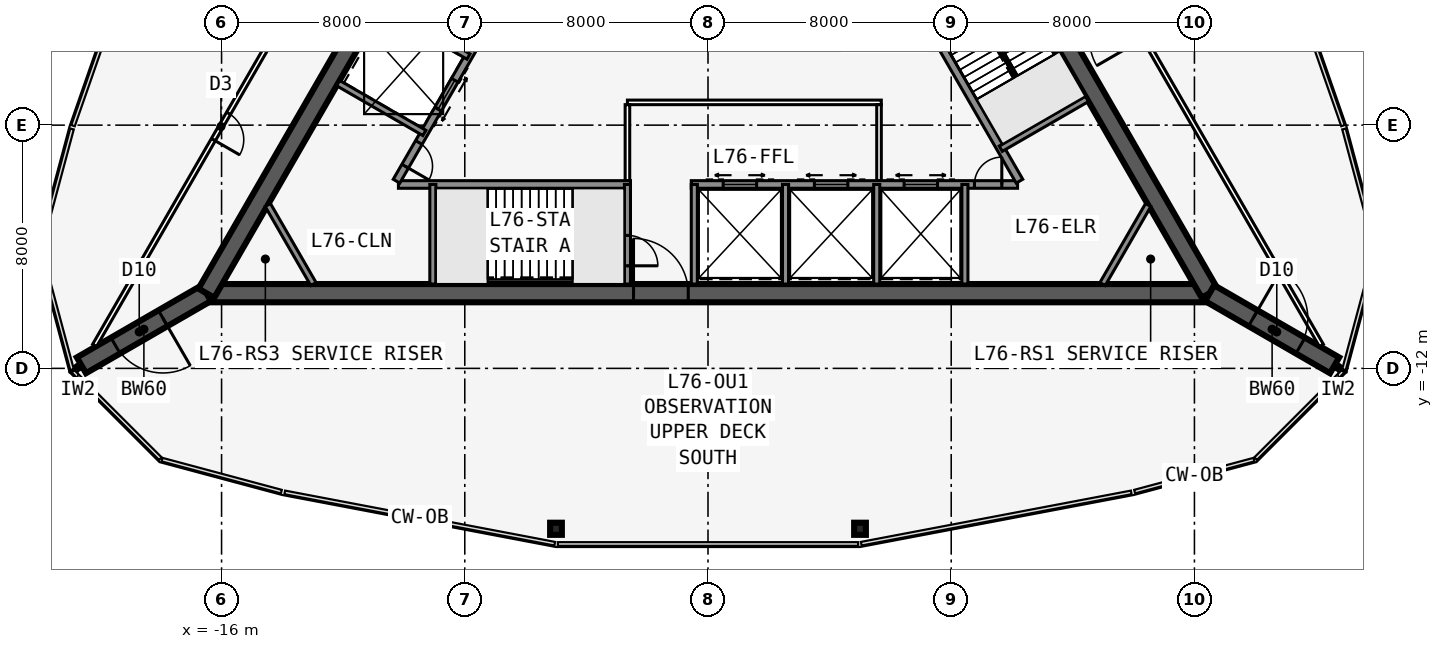
"""IFC4 building model, lengths in metres.
Left out: names, types, materials, properties, quantities, classifications, styles, units other than length and angle.
Written with IfcOpenShell. Run it as: python <this file> out.ifc"""

import sys

from ifc_helpers import new_model, si_unit, direction, frame, frame_2d, origin, origin_2d, place, context, subcontext, project, spatial, rectangle, i_section, extrude, element, fill, save


model = new_model("IFC4")
c1 = context("Model", 3, precision=1e-05, world=origin(), true_north=direction((0.0, 1.0)))
c2 = subcontext(c1, "Body", "Model", "MODEL_VIEW")
j1 = project(units=[si_unit("LENGTHUNIT", "METRE"), si_unit("PLANEANGLEUNIT", "RADIAN")], contexts=[c1])
p1 = place(None, origin())
s1 = spatial("IfcSite", under=j1, at=p1, CompositionType="ELEMENT")
p2 = place(p1, origin())
s2 = spatial("IfcBuilding", under=s1, at=p2, CompositionType="ELEMENT")
p3 = place(p2, frame((0.0, 0.0, 292.8)))
s3 = spatial("IfcBuildingStorey", under=s2, at=p3, CompositionType="ELEMENT", Elevation=292.8)
p4 = place(p3, frame((-16.5, -9.526, 0.0), z_axis=(0.0, 0.0, 1.0), x_axis=(1.0, 0.0, 0.0)))
e1 = element("IfcWall", 1, at=p4, inside=s3, PredefinedType="SHEAR", context=c2, shape_type="SweptSolid", body=[
    extrude(rectangle(XDim=33.0, YDim=0.6, at=frame_2d((16.5, 0.0))), origin(), (0.0, 0.0, 1.0), 5.0),
])
p5 = place(p4, frame((14.05, 0.0, 0.0)))
e2 = element("IfcOpeningElement", 2, at=p5, cuts=e1, PredefinedType="OPENING", context=c2, shape_type="SweptSolid", body=[
    extrude(rectangle(XDim=1.8, YDim=2.13, at=frame_2d((0.9, 1.065))), frame((0.0, 0.31, 0.0), z_axis=(0.0, -1.0, 0.0), x_axis=(1.0, 0.0, 0.0)), (0.0, 0.0, 1.0), 0.62),
])
p6 = place(p3, frame((-10.183, -5.951, 0.0), z_axis=(0.0, 0.0, 1.0), x_axis=(1.0, 0.0, 0.0)))
e3 = element("IfcWall", 3, at=p6, inside=s3, PredefinedType="SOLIDWALL", context=c2, shape_type="SweptSolid", body=[
    extrude(rectangle(XDim=7.633, YDim=0.25, at=frame_2d((3.816, 0.0))), origin(), (0.0, 0.0, 1.0), 4.75),
])
p7 = place(p3, frame((-0.55, -5.951, 0.0), z_axis=(0.0, 0.0, 1.0), x_axis=(1.0, 0.0, 0.0)))
e4 = element("IfcWall", 4, at=p7, inside=s3, PredefinedType="SOLIDWALL", context=c2, shape_type="SweptSolid", body=[
    extrude(rectangle(XDim=10.733, YDim=0.25, at=frame_2d((5.366, 0.0))), origin(), (0.0, 0.0, 1.0), 4.75),
])
p8 = place(p7, frame((9.314, 0.0, 0.0)))
e5 = element("IfcOpeningElement", 5, at=p8, cuts=e4, PredefinedType="OPENING", context=c2, shape_type="SweptSolid", body=[
    extrude(rectangle(XDim=0.9, YDim=2.13, at=frame_2d((0.45, 1.065))), frame((0.0, 0.135, 0.0), z_axis=(0.0, -1.0, 0.0), x_axis=(1.0, 0.0, 0.0)), (0.0, 0.0, 1.0), 0.27),
])
p9 = place(p7, frame((1.05, 0.0, 0.0)))
e6 = element("IfcOpeningElement", 6, at=p9, cuts=e4, PredefinedType="OPENING", context=c2, shape_type="SweptSolid", body=[
    extrude(rectangle(XDim=1.1, YDim=2.13, at=frame_2d((0.55, 1.065))), frame((0.0, 0.135, 0.0), z_axis=(0.0, -1.0, 0.0), x_axis=(1.0, 0.0, 0.0)), (0.0, 0.0, 1.0), 0.27),
])
p10 = place(p7, frame((4.05, 0.0, 0.0)))
e7 = element("IfcOpeningElement", 7, at=p10, cuts=e4, PredefinedType="OPENING", context=c2, shape_type="SweptSolid", body=[
    extrude(rectangle(XDim=1.1, YDim=2.13, at=frame_2d((0.55, 1.065))), frame((0.0, 0.135, 0.0), z_axis=(0.0, -1.0, 0.0), x_axis=(1.0, 0.0, 0.0)), (0.0, 0.0, 1.0), 0.27),
])
p11 = place(p7, frame((7.0, 0.0, 0.0)))
e8 = element("IfcOpeningElement", 8, at=p11, cuts=e4, PredefinedType="OPENING", context=c2, shape_type="SweptSolid", body=[
    extrude(rectangle(XDim=1.1, YDim=2.13, at=frame_2d((0.55, 1.065))), frame((0.0, 0.135, 0.0), z_axis=(0.0, -1.0, 0.0), x_axis=(1.0, 0.0, 0.0)), (0.0, 0.0, 1.0), 0.27),
])
p12 = place(p3, frame((-9.05, -5.951, 0.0), z_axis=(0.0, 0.0, 1.0), x_axis=(0.0, -1.0, 0.0)))
e9 = element("IfcWall", 9, at=p12, inside=s3, PredefinedType="SOLIDWALL", context=c2, shape_type="SweptSolid", body=[
    extrude(rectangle(XDim=3.275, YDim=0.2, at=frame_2d((1.637, 0.0))), origin(), (0.0, 0.0, 1.0), 4.75),
])
p13 = place(p3, frame((-2.65, -5.951, 0.0), z_axis=(0.0, 0.0, 1.0), x_axis=(0.0, -1.0, 0.0)))
e10 = element("IfcWall", 10, at=p13, inside=s3, PredefinedType="SOLIDWALL", context=c2, shape_type="SweptSolid", body=[
    extrude(rectangle(XDim=3.275, YDim=0.2, at=frame_2d((1.637, 0.0))), origin(), (0.0, 0.0, 1.0), 4.75),
])
p14 = place(p13, frame((1.675, 0.0, 0.0)))
e11 = element("IfcOpeningElement", 11, at=p14, cuts=e10, PredefinedType="OPENING", context=c2, shape_type="SweptSolid", body=[
    extrude(rectangle(XDim=1.0, YDim=2.13, at=frame_2d((0.5, 1.065))), frame((0.0, 0.11, 0.0), z_axis=(0.0, -1.0, 0.0), x_axis=(1.0, 0.0, 0.0)), (0.0, 0.0, 1.0), 0.22),
])
for number, where, z_axis, x_axis in (
    (12, (-0.45, -5.951, 0.0), (0.0, 0.0, 1.0), (0.0, -1.0, 0.0)),
    (13, (2.55, -5.951, 0.0), (0.0, 0.0, 1.0), (0.0, -1.0, 0.0)),
    (14, (5.55, -5.951, 0.0), (0.0, 0.0, 1.0), (0.0, -1.0, 0.0)),
    (15, (8.45, -5.951, 0.0), (0.0, 0.0, 1.0), (0.0, -1.0, 0.0)),
):
    element("IfcWall", number, at=place(p3, frame(where, z_axis=z_axis, x_axis=x_axis)), inside=s3, PredefinedType="SOLIDWALL", context=c2, shape_type="SweptSolid", body=[
        extrude(rectangle(XDim=3.275, YDim=0.2, at=frame_2d((1.637, 0.0))), origin(), (0.0, 0.0, 1.0), 4.75),
    ])
p15 = place(p3, frame((16.5, -9.526, 0.0), z_axis=(0.0, 0.0, 1.0), x_axis=(-0.499999749417, 0.866025548458, 0.0)))
e16 = element("IfcWall", 16, at=p15, inside=s3, PredefinedType="SHEAR", context=c2, shape_type="SweptSolid", body=[
    extrude(rectangle(XDim=33.0, YDim=0.6, at=frame_2d((16.5, 0.0))), origin(), (0.0, 0.0, 1.0), 5.0),
])
p16 = place(p15, frame((14.15, 0.0, 0.0)))
e17 = element("IfcOpeningElement", 17, at=p16, cuts=e16, PredefinedType="OPENING", context=c2, shape_type="SweptSolid", body=[
    extrude(rectangle(XDim=1.8, YDim=2.13, at=frame_2d((0.9, 1.065))), frame((0.0, 0.31, 0.0), z_axis=(0.0, -1.0, 0.0), x_axis=(1.0, 0.0, 0.0)), (0.0, 0.0, 1.0), 0.62),
])
p17 = place(p15, frame((12.6, 0.0, 0.0)))
e18 = element("IfcOpeningElement", 18, at=p17, cuts=e16, PredefinedType="OPENING", context=c2, shape_type="SweptSolid", body=[
    extrude(rectangle(XDim=1.0, YDim=2.13, at=frame_2d((0.5, 1.065))), frame((0.0, 0.31, 0.0), z_axis=(0.0, -1.0, 0.0), x_axis=(1.0, 0.0, 0.0)), (0.0, 0.0, 1.0), 0.62),
])
p18 = place(p3, frame((10.245, -5.843, 0.0), z_axis=(0.0, 0.0, 1.0), x_axis=(-0.499993009313, 0.866029439822, 0.0)))
e19 = element("IfcWall", 19, at=p18, inside=s3, PredefinedType="SOLIDWALL", context=c2, shape_type="SweptSolid", body=[
    extrude(rectangle(XDim=7.733, YDim=0.25, at=frame_2d((3.866, 0.0))), origin(), (0.0, 0.0, 1.0), 4.75),
])
p19 = place(p3, frame((9.629, -4.775, 0.0), z_axis=(0.0, 0.0, 1.0), x_axis=(0.865995643347, 0.500051543047, 0.0)))
e20 = element("IfcWall", 20, at=p19, inside=s3, PredefinedType="SOLIDWALL", context=c2, shape_type="SweptSolid", body=[
    extrude(rectangle(XDim=3.275, YDim=0.2, at=frame_2d((1.638, 0.0))), origin(), (0.0, 0.0, 1.0), 4.75),
])
p20 = place(p3, frame((0.0, 19.052, 0.0), z_axis=(0.0, 0.0, 1.0), x_axis=(-0.499999749417, -0.866025548458, 0.0)))
e21 = element("IfcWall", 21, at=p20, inside=s3, PredefinedType="SHEAR", context=c2, shape_type="SweptSolid", body=[
    extrude(rectangle(XDim=33.0, YDim=0.6, at=frame_2d((16.5, 0.0))), origin(), (0.0, 0.0, 1.0), 5.0),
])
p21 = place(p20, frame((14.15, 0.0, 0.0)))
e22 = element("IfcOpeningElement", 22, at=p21, cuts=e21, PredefinedType="OPENING", context=c2, shape_type="SweptSolid", body=[
    extrude(rectangle(XDim=1.8, YDim=2.13, at=frame_2d((0.9, 1.065))), frame((0.0, 0.31, 0.0), z_axis=(0.0, -1.0, 0.0), x_axis=(1.0, 0.0, 0.0)), (0.0, 0.0, 1.0), 0.62),
])
p22 = place(p20, frame((12.6, 0.0, 0.0)))
e23 = element("IfcOpeningElement", 23, at=p22, cuts=e21, PredefinedType="OPENING", context=c2, shape_type="SweptSolid", body=[
    extrude(rectangle(XDim=1.0, YDim=2.13, at=frame_2d((0.5, 1.065))), frame((0.0, 0.31, 0.0), z_axis=(0.0, -1.0, 0.0), x_axis=(1.0, 0.0, 0.0)), (0.0, 0.0, 1.0), 0.62),
])
p23 = place(p3, frame((-4.929, 3.365, 0.0), z_axis=(0.0, 0.0, 1.0), x_axis=(-0.499991433582, -0.866030349552, 0.0)))
e24 = element("IfcWall", 24, at=p23, inside=s3, PredefinedType="SOLIDWALL", context=c2, shape_type="SweptSolid", body=[
    extrude(rectangle(XDim=10.633, YDim=0.25, at=frame_2d((5.316, 0.0))), origin(), (0.0, 0.0, 1.0), 4.75),
])
p24 = place(p23, frame((9.164, 0.0, 0.0)))
e25 = element("IfcOpeningElement", 25, at=p24, cuts=e24, PredefinedType="OPENING", context=c2, shape_type="SweptSolid", body=[
    extrude(rectangle(XDim=0.9, YDim=2.13, at=frame_2d((0.45, 1.065))), frame((0.0, 0.135, 0.0), z_axis=(0.0, -1.0, 0.0), x_axis=(1.0, 0.0, 0.0)), (0.0, 0.0, 1.0), 0.27),
])
p25 = place(p23, frame((1.1, 0.0, 0.0)))
e26 = element("IfcOpeningElement", 26, at=p25, cuts=e24, PredefinedType="OPENING", context=c2, shape_type="SweptSolid", body=[
    extrude(rectangle(XDim=0.9, YDim=2.13, at=frame_2d((0.45, 1.065))), frame((0.0, 0.135, 0.0), z_axis=(0.0, -1.0, 0.0), x_axis=(1.0, 0.0, 0.0)), (0.0, 0.0, 1.0), 0.27),
])
p26 = place(p23, frame((4.0, 0.0, 0.0)))
e27 = element("IfcOpeningElement", 27, at=p26, cuts=e24, PredefinedType="OPENING", context=c2, shape_type="SweptSolid", body=[
    extrude(rectangle(XDim=0.9, YDim=2.13, at=frame_2d((0.45, 1.065))), frame((0.0, 0.135, 0.0), z_axis=(0.0, -1.0, 0.0), x_axis=(1.0, 0.0, 0.0)), (0.0, 0.0, 1.0), 0.27),
])
p27 = place(p23, frame((6.8, 0.0, 0.0)))
e28 = element("IfcOpeningElement", 28, at=p27, cuts=e24, PredefinedType="OPENING", context=c2, shape_type="SweptSolid", body=[
    extrude(rectangle(XDim=1.1, YDim=2.13, at=frame_2d((0.55, 1.065))), frame((0.0, 0.135, 0.0), z_axis=(0.0, -1.0, 0.0), x_axis=(1.0, 0.0, 0.0)), (0.0, 0.0, 1.0), 0.27),
])
for number, where, z_axis, x_axis in (
    (29, (-7.879, -1.744, 0.0), (0.0, 0.0, 1.0), (-0.866, 0.5, 0.0)),
    (30, (-9.329, -4.256, 0.0), (0.0, 0.0, 1.0), (-0.866, 0.5, 0.0)),
):
    element("IfcWall", number, at=place(p3, frame(where, z_axis=z_axis, x_axis=x_axis)), inside=s3, PredefinedType="SOLIDWALL", context=c2, shape_type="SweptSolid", body=[
        extrude(rectangle(XDim=3.275, YDim=0.2, at=frame_2d((1.637, 0.0))), origin(), (0.0, 0.0, 1.0), 4.75),
    ])
p28 = place(p3, frame((16.5, -9.526, 0.0), z_axis=(0.0, 0.0, 1.0), x_axis=(0.866031398331, -0.499989616998, 0.0)))
e31 = element("IfcWall", 31, at=p28, inside=s3, PredefinedType="SHEAR", context=c2, shape_type="SweptSolid", body=[
    extrude(rectangle(XDim=4.746, YDim=0.6, at=frame_2d((2.373, 0.0))), origin(), (0.0, 0.0, 1.0), 5.0),
])
p29 = place(p28, frame((1.65, 0.0, 0.0)))
e32 = element("IfcOpeningElement", 32, at=p29, cuts=e31, PredefinedType="OPENING", context=c2, shape_type="SweptSolid", body=[
    extrude(rectangle(XDim=1.8, YDim=2.13, at=frame_2d((0.9, 1.065))), frame((0.0, 0.31, 0.0), z_axis=(0.0, -1.0, 0.0), x_axis=(1.0, 0.0, 0.0)), (0.0, 0.0, 1.0), 0.62),
])
p30 = place(p3, frame((-16.5, -9.526, 0.0), z_axis=(0.0, 0.0, 1.0), x_axis=(-0.866031398331, -0.499989616998, 0.0)))
e33 = element("IfcWall", 33, at=p30, inside=s3, PredefinedType="SHEAR", context=c2, shape_type="SweptSolid", body=[
    extrude(rectangle(XDim=4.746, YDim=0.6, at=frame_2d((2.373, 0.0))), origin(), (0.0, 0.0, 1.0), 5.0),
])
p31 = place(p30, frame((1.65, 0.0, 0.0)))
e34 = element("IfcOpeningElement", 34, at=p31, cuts=e33, PredefinedType="OPENING", context=c2, shape_type="SweptSolid", body=[
    extrude(rectangle(XDim=1.8, YDim=2.13, at=frame_2d((0.9, 1.065))), frame((0.0, 0.31, 0.0), z_axis=(0.0, -1.0, 0.0), x_axis=(1.0, 0.0, 0.0)), (0.0, 0.0, 1.0), 0.62),
])
for number, where, z_axis, x_axis in (
    (35, (-5.0, -17.276, 0.0), (0.0, 0.0, 1.0), (0.0, -1.0, 0.0)),
    (36, (5.0, -17.276, 0.0), (0.0, 0.0, 1.0), (0.0, -1.0, 0.0)),
):
    element("IfcColumn", number, at=place(p3, frame(where, z_axis=z_axis, x_axis=x_axis)), inside=s3, PredefinedType="COLUMN", context=c2, shape_type="SweptSolid", body=[
        extrude(i_section(OverallWidth=0.399, OverallDepth=0.386, WebThickness=0.021, FlangeThickness=0.033, at=origin_2d()), origin(), (0.0, 0.0, 1.0), 5.0),
    ])
p32 = place(p3, frame((20.177, -11.245, 0.0), z_axis=(0.0, 0.0, 1.0), x_axis=(-0.499998875317, 0.866026053119, 0.0)))
e37 = element("IfcWall", 37, at=p32, inside=s3, PredefinedType="PARTITIONING", context=c2, shape_type="SweptSolid", body=[
    extrude(rectangle(XDim=39.654, YDim=0.15, at=frame_2d((19.827, 0.0))), origin(), (0.0, 0.0, 1.0), 4.75),
])
p33 = place(p32, frame((11.664, 0.0, 0.0)))
e38 = element("IfcOpeningElement", 38, at=p33, cuts=e37, PredefinedType="OPENING", context=c2, shape_type="SweptSolid", body=[
    extrude(rectangle(XDim=1.8, YDim=2.13, at=frame_2d((0.9, 1.065))), frame((0.0, 0.085, 0.0), z_axis=(0.0, -1.0, 0.0), x_axis=(1.0, 0.0, 0.0)), (0.0, 0.0, 1.0), 0.17),
])
p34 = place(p32, frame((31.19, 0.0, 0.0)))
e39 = element("IfcOpeningElement", 39, at=p34, cuts=e37, PredefinedType="OPENING", context=c2, shape_type="SweptSolid", body=[
    extrude(rectangle(XDim=1.8, YDim=2.13, at=frame_2d((0.9, 1.065))), frame((0.0, 0.085, 0.0), z_axis=(0.0, -1.0, 0.0), x_axis=(1.0, 0.0, 0.0)), (0.0, 0.0, 1.0), 0.17),
])
p35 = place(p3, frame((-0.35, 23.096, 0.0), z_axis=(0.0, 0.0, 1.0), x_axis=(-0.499998875317, -0.866026053119, 0.0)))
e40 = element("IfcWall", 40, at=p35, inside=s3, PredefinedType="PARTITIONING", context=c2, shape_type="SweptSolid", body=[
    extrude(rectangle(XDim=39.654, YDim=0.15, at=frame_2d((19.827, 0.0))), origin(), (0.0, 0.0, 1.0), 4.75),
])
p36 = place(p35, frame((6.664, 0.0, 0.0)))
e41 = element("IfcOpeningElement", 41, at=p36, cuts=e40, PredefinedType="OPENING", context=c2, shape_type="SweptSolid", body=[
    extrude(rectangle(XDim=1.8, YDim=2.13, at=frame_2d((0.9, 1.065))), frame((0.0, 0.085, 0.0), z_axis=(0.0, -1.0, 0.0), x_axis=(1.0, 0.0, 0.0)), (0.0, 0.0, 1.0), 0.17),
])
p37 = place(p35, frame((15.827, 0.0, 0.0)))
e42 = element("IfcOpeningElement", 42, at=p37, cuts=e40, PredefinedType="OPENING", context=c2, shape_type="SweptSolid", body=[
    extrude(rectangle(XDim=1.0, YDim=2.13, at=frame_2d((0.5, 1.065))), frame((0.0, 0.085, 0.0), z_axis=(0.0, -1.0, 0.0), x_axis=(1.0, 0.0, 0.0)), (0.0, 0.0, 1.0), 0.17),
])
p38 = place(p35, frame((18.827, 0.0, 0.0)))
e43 = element("IfcOpeningElement", 43, at=p38, cuts=e40, PredefinedType="OPENING", context=c2, shape_type="SweptSolid", body=[
    extrude(rectangle(XDim=1.0, YDim=2.13, at=frame_2d((0.5, 1.065))), frame((0.0, 0.085, 0.0), z_axis=(0.0, -1.0, 0.0), x_axis=(1.0, 0.0, 0.0)), (0.0, 0.0, 1.0), 0.17),
])
p39 = place(p35, frame((21.577, 0.0, 0.0)))
e44 = element("IfcOpeningElement", 44, at=p39, cuts=e40, PredefinedType="OPENING", context=c2, shape_type="SweptSolid", body=[
    extrude(rectangle(XDim=1.0, YDim=2.13, at=frame_2d((0.5, 1.065))), frame((0.0, 0.085, 0.0), z_axis=(0.0, -1.0, 0.0), x_axis=(1.0, 0.0, 0.0)), (0.0, 0.0, 1.0), 0.17),
])
p40 = place(p35, frame((30.841, 0.0, 0.0)))
e45 = element("IfcOpeningElement", 45, at=p40, cuts=e40, PredefinedType="OPENING", context=c2, shape_type="SweptSolid", body=[
    extrude(rectangle(XDim=1.0, YDim=2.13, at=frame_2d((0.5, 1.065))), frame((0.0, 0.085, 0.0), z_axis=(0.0, -1.0, 0.0), x_axis=(1.0, 0.0, 0.0)), (0.0, 0.0, 1.0), 0.17),
])
for number, where, z_axis, x_axis in (
    (46, (20.61, -11.899, 0.0), (0.0, 0.0, 1.0), (0.866, -0.5, 0.0)),
    (47, (-20.61, -11.899, 0.0), (0.0, 0.0, 1.0), (-0.866, -0.5, 0.0)),
):
    element("IfcWall", number, at=place(p3, frame(where, z_axis=z_axis, x_axis=x_axis)), inside=s3, PredefinedType="PARTITIONING", context=c2, shape_type="SweptSolid", body=[
        extrude(rectangle(XDim=0.27, YDim=0.15, at=frame_2d((0.135, 0.0))), origin(), (0.0, 0.0, 1.0), 4.75),
    ])
p41 = place(p3, frame((-2.65, -3.251, 0.0), z_axis=(0.0, 0.0, 1.0), x_axis=(1.0, 0.0, 0.0)))
e48 = element("IfcWall", 48, at=p41, inside=s3, PredefinedType="PARTITIONING", context=c2, shape_type="SweptSolid", body=[
    extrude(rectangle(XDim=8.35, YDim=0.15, at=frame_2d((4.175, 0.0))), origin(), (0.0, 0.0, 1.0), 4.75),
])
for number, where, z_axis, x_axis in (
    (49, (-2.65, -5.826, 0.0), (0.0, 0.0, 1.0), (0.0, 1.0, 0.0)),
    (50, (5.625, -5.826, 0.0), (0.0, 0.0, 1.0), (0.0, 1.0, 0.0)),
):
    element("IfcWall", number, at=place(p3, frame(where, z_axis=z_axis, x_axis=x_axis)), inside=s3, PredefinedType="PARTITIONING", context=c2, shape_type="SweptSolid", body=[
        extrude(rectangle(XDim=2.5, YDim=0.15, at=frame_2d((1.25, 0.0))), origin(), (0.0, 0.0, 1.0), 4.75),
    ])
for number, where, z_axis, x_axis in (
    (51, (14.479, -6.626, 0.0), (0.0, 0.0, 1.0), (-0.5, -0.866, 0.0)),
    (52, (-12.978, -9.226, 0.0), (0.0, 0.0, 1.0), (-0.5, 0.866, 0.0)),
):
    element("IfcWall", number, at=place(p3, frame(where, z_axis=z_axis, x_axis=x_axis)), inside=s3, PredefinedType="SOLIDWALL", context=c2, shape_type="SweptSolid", body=[
        extrude(rectangle(XDim=3.002, YDim=0.2, at=frame_2d((1.501, 0.0))), origin(), (0.0, 0.0, 1.0), 4.75),
    ])
p42 = place(p3, frame((-7.247, -7.576, 0.0), z_axis=(0.0, 0.0, 1.0), x_axis=(1.0, 0.0, 0.0)))
e53 = element("IfcWall", 53, at=p42, inside=s3, PredefinedType="SOLIDWALL", context=c2, shape_type="SweptSolid", body=[
    extrude(rectangle(XDim=2.794, YDim=0.1, at=frame_2d((1.397, 0.0))), origin(), (0.0, 0.0, 1.0), 5.0),
])
p43 = place(p3, frame((10.135, -2.401, 0.0), z_axis=(0.0, 0.0, 1.0), x_axis=(-0.499992232847, 0.866029888106, 0.0)))
e54 = element("IfcWall", 54, at=p43, inside=s3, PredefinedType="SOLIDWALL", context=c2, shape_type="SweptSolid", body=[
    extrude(rectangle(XDim=2.794, YDim=0.1, at=frame_2d((1.397, 0.0))), origin(), (0.0, 0.0, 1.0), 5.0),
])
p44 = place(p40, origin())
e55 = element("IfcDoor", 55, at=p44, inside=s3, OperationType="SINGLE_SWING_RIGHT", PredefinedType="DOOR", context=c2, shape_type="SweptSolid", body=[
    extrude(rectangle(XDim=1.0, YDim=2.13, at=frame_2d((0.5, 1.065))), frame((0.0, 0.025, 0.0), z_axis=(0.0, -1.0, 0.0), x_axis=(1.0, 0.0, 0.0)), (0.0, 0.0, 1.0), 0.05),
])
fill(e45, e55)
p45 = place(p5, origin())
e56 = element("IfcDoor", 56, at=p45, inside=s3, OperationType="DOUBLE_DOOR_SINGLE_SWING", PredefinedType="DOOR", context=c2, shape_type="SweptSolid", body=[
    extrude(rectangle(XDim=1.8, YDim=2.13, at=frame_2d((0.9, 1.065))), frame((0.0, 0.025, 0.0), z_axis=(0.0, -1.0, 0.0), x_axis=(1.0, 0.0, 0.0)), (0.0, 0.0, 1.0), 0.05),
])
fill(e2, e56)
p46 = place(p14, origin())
e57 = element("IfcDoor", 57, at=p46, inside=s3, OperationType="SINGLE_SWING_RIGHT", PredefinedType="DOOR", context=c2, shape_type="SweptSolid", body=[
    extrude(rectangle(XDim=1.0, YDim=2.13, at=frame_2d((0.5, 1.065))), frame((0.0, 0.025, 0.0), z_axis=(0.0, -1.0, 0.0), x_axis=(1.0, 0.0, 0.0)), (0.0, 0.0, 1.0), 0.05),
])
fill(e11, e57)
p47 = place(p29, origin())
e58 = element("IfcDoor", 58, at=p47, inside=s3, OperationType="DOUBLE_DOOR_DOUBLE_SWING", PredefinedType="DOOR", context=c2, shape_type="SweptSolid", body=[
    extrude(rectangle(XDim=1.8, YDim=2.13, at=frame_2d((0.9, 1.065))), frame((0.0, 0.025, 0.0), z_axis=(0.0, -1.0, 0.0), x_axis=(1.0, 0.0, 0.0)), (0.0, 0.0, 1.0), 0.05),
])
fill(e32, e58)
p48 = place(p31, origin())
e59 = element("IfcDoor", 59, at=p48, inside=s3, OperationType="DOUBLE_DOOR_DOUBLE_SWING", PredefinedType="DOOR", context=c2, shape_type="SweptSolid", body=[
    extrude(rectangle(XDim=1.8, YDim=2.13, at=frame_2d((0.9, 1.065))), frame((0.0, 0.025, 0.0), z_axis=(0.0, -1.0, 0.0), x_axis=(1.0, 0.0, 0.0)), (0.0, 0.0, 1.0), 0.05),
])
fill(e34, e59)
p49 = place(p8, origin())
e60 = element("IfcDoor", 60, at=p49, inside=s3, OperationType="SINGLE_SWING_RIGHT", PredefinedType="DOOR", context=c2, shape_type="SweptSolid", body=[
    extrude(rectangle(XDim=0.9, YDim=2.13, at=frame_2d((0.45, 1.065))), frame((0.0, 0.025, 0.0), z_axis=(0.0, -1.0, 0.0), x_axis=(1.0, 0.0, 0.0)), (0.0, 0.0, 1.0), 0.05),
])
fill(e5, e60)
p50 = place(p24, origin())
e61 = element("IfcDoor", 61, at=p50, inside=s3, OperationType="SINGLE_SWING_RIGHT", PredefinedType="DOOR", context=c2, shape_type="SweptSolid", body=[
    extrude(rectangle(XDim=0.9, YDim=2.13, at=frame_2d((0.45, 1.065))), frame((0.0, 0.025, 0.0), z_axis=(0.0, -1.0, 0.0), x_axis=(1.0, 0.0, 0.0)), (0.0, 0.0, 1.0), 0.05),
])
fill(e25, e61)
p51 = place(p9, origin())
e62 = element("IfcDoor", 62, at=p51, inside=s3, OperationType="DOUBLE_DOOR_SLIDING", PredefinedType="USERDEFINED", context=c2, shape_type="SweptSolid", body=[
    extrude(rectangle(XDim=1.1, YDim=2.13, at=frame_2d((0.55, 1.065))), frame((0.0, 0.025, 0.0), z_axis=(0.0, -1.0, 0.0), x_axis=(1.0, 0.0, 0.0)), (0.0, 0.0, 1.0), 0.05),
])
fill(e6, e62)
p52 = place(p10, origin())
e63 = element("IfcDoor", 63, at=p52, inside=s3, OperationType="DOUBLE_DOOR_SLIDING", PredefinedType="USERDEFINED", context=c2, shape_type="SweptSolid", body=[
    extrude(rectangle(XDim=1.1, YDim=2.13, at=frame_2d((0.55, 1.065))), frame((0.0, 0.025, 0.0), z_axis=(0.0, -1.0, 0.0), x_axis=(1.0, 0.0, 0.0)), (0.0, 0.0, 1.0), 0.05),
])
fill(e7, e63)
p53 = place(p11, origin())
e64 = element("IfcDoor", 64, at=p53, inside=s3, OperationType="DOUBLE_DOOR_SLIDING", PredefinedType="USERDEFINED", context=c2, shape_type="SweptSolid", body=[
    extrude(rectangle(XDim=1.1, YDim=2.13, at=frame_2d((0.55, 1.065))), frame((0.0, 0.025, 0.0), z_axis=(0.0, -1.0, 0.0), x_axis=(1.0, 0.0, 0.0)), (0.0, 0.0, 1.0), 0.05),
])
fill(e8, e64)
p54 = place(p27, origin())
e65 = element("IfcDoor", 65, at=p54, inside=s3, OperationType="DOUBLE_DOOR_SLIDING", PredefinedType="USERDEFINED", context=c2, shape_type="SweptSolid", body=[
    extrude(rectangle(XDim=1.1, YDim=2.13, at=frame_2d((0.55, 1.065))), frame((0.0, 0.025, 0.0), z_axis=(0.0, -1.0, 0.0), x_axis=(1.0, 0.0, 0.0)), (0.0, 0.0, 1.0), 0.05),
])
fill(e28, e65)
save(model, sys.argv[1])
